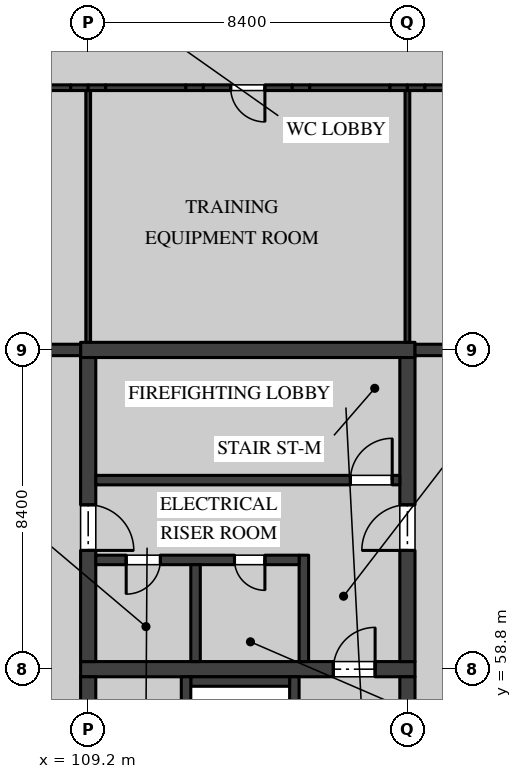
"""IFC4 building model, lengths in metres.
Left out: names, types, materials, properties, quantities, classifications, styles, units other than length and angle.
Written with IfcOpenShell. Run it as: python <this file> out.ifc"""

import sys

from ifc_helpers import new_model, si_unit, direction, frame, frame_2d, origin, place, context, subcontext, project, spatial, rectangle, extrude, element, fill, save


model = new_model("IFC4")
c1 = context("Model", 3, precision=1e-05, world=origin(), true_north=direction((0.0, 1.0)))
c2 = subcontext(c1, "Body", "Model", "MODEL_VIEW")
j1 = project(units=[si_unit("LENGTHUNIT", "METRE"), si_unit("PLANEANGLEUNIT", "RADIAN")], contexts=[c1])
p1 = place(None, origin())
s1 = spatial("IfcSite", under=j1, at=p1, CompositionType="ELEMENT")
p2 = place(p1, origin())
s2 = spatial("IfcBuilding", under=s1, at=p2, CompositionType="ELEMENT")
p3 = place(p2, frame((0.0, 0.0, 18.9)))
s3 = spatial("IfcBuildingStorey", under=s2, at=p3, CompositionType="ELEMENT", Elevation=18.9)
p4 = place(p3, frame((109.0, 58.8, 0.0), z_axis=(0.0, 0.0, 1.0), x_axis=(1.0, 0.0, 0.0)))
e1 = element("IfcWall", 1, at=p4, inside=s3, PredefinedType="SHEAR", context=c2, shape_type="SweptSolid", body=[
    extrude(rectangle(XDim=8.8, YDim=0.4, at=frame_2d((4.4, 0.0))), origin(), (0.0, 0.0, 1.0), 4.37),
])
p5 = place(p4, frame((6.65, 0.0, 0.0)))
e2 = element("IfcOpeningElement", 2, at=p5, cuts=e1, PredefinedType="OPENING", context=c2, shape_type="SweptSolid", body=[
    extrude(rectangle(XDim=1.1, YDim=2.1, at=frame_2d((0.55, 1.05))), frame((0.0, 0.21, 0.0), z_axis=(0.0, -1.0, 0.0), x_axis=(1.0, 0.0, 0.0)), (0.0, 0.0, 1.0), 0.42),
])
p6 = place(p3, frame((109.2, 50.6, 0.0), z_axis=(0.0, 0.0, 1.0), x_axis=(0.0, 1.0, 0.0)))
e3 = element("IfcWall", 3, at=p6, inside=s3, PredefinedType="SHEAR", context=c2, shape_type="SweptSolid", body=[
    extrude(rectangle(XDim=8.0, YDim=0.4, at=frame_2d((4.0, 0.0))), origin(), (0.0, 0.0, 1.0), 4.37),
])
p7 = place(p6, frame((3.25, 0.0, 0.0)))
e4 = element("IfcOpeningElement", 4, at=p7, cuts=e3, PredefinedType="OPENING", context=c2, shape_type="SweptSolid", body=[
    extrude(rectangle(XDim=1.2, YDim=2.1, at=frame_2d((0.6, 1.05))), frame((0.0, 0.21, 0.0), z_axis=(0.0, -1.0, 0.0), x_axis=(1.0, 0.0, 0.0)), (0.0, 0.0, 1.0), 0.42),
])
p8 = place(p3, frame((117.6, 50.6, 0.0), z_axis=(0.0, 0.0, 1.0), x_axis=(0.0, 1.0, 0.0)))
e5 = element("IfcWall", 5, at=p8, inside=s3, PredefinedType="SHEAR", context=c2, shape_type="SweptSolid", body=[
    extrude(rectangle(XDim=8.0, YDim=0.4, at=frame_2d((4.0, 0.0))), origin(), (0.0, 0.0, 1.0), 4.37),
])
p9 = place(p8, frame((3.25, 0.0, 0.0)))
e6 = element("IfcOpeningElement", 6, at=p9, cuts=e5, PredefinedType="OPENING", context=c2, shape_type="SweptSolid", body=[
    extrude(rectangle(XDim=1.2, YDim=2.1, at=frame_2d((0.6, 1.05))), frame((0.0, 0.21, 0.0), z_axis=(0.0, -1.0, 0.0), x_axis=(1.0, 0.0, 0.0)), (0.0, 0.0, 1.0), 0.42),
])
p10 = place(p8, frame((6.0, 0.0, 0.0)))
e7 = element("IfcOpeningElement", 7, at=p10, cuts=e5, PredefinedType="OPENING", context=c2, shape_type="SweptSolid", body=[
    extrude(rectangle(XDim=1.2, YDim=2.1, at=frame_2d((0.6, 1.05))), frame((0.0, 0.21, 0.0), z_axis=(0.0, -1.0, 0.0), x_axis=(1.0, 0.0, 0.0)), (0.0, 0.0, 1.0), 0.42),
])
p11 = place(p3, frame((109.0, 67.2, 0.0), z_axis=(0.0, 0.0, 1.0), x_axis=(1.0, 0.0, 0.0)))
e8 = element("IfcWall", 8, at=p11, inside=s3, PredefinedType="SHEAR", context=c2, shape_type="SweptSolid", body=[
    extrude(rectangle(XDim=8.8, YDim=0.4, at=frame_2d((4.4, 0.0))), origin(), (0.0, 0.0, 1.0), 4.37),
])
p12 = place(p3, frame((109.2, 59.0, 0.0), z_axis=(0.0, 0.0, 1.0), x_axis=(0.0, 1.0, 0.0)))
e9 = element("IfcWall", 9, at=p12, inside=s3, PredefinedType="SHEAR", context=c2, shape_type="SweptSolid", body=[
    extrude(rectangle(XDim=8.0, YDim=0.4, at=frame_2d((4.0, 0.0))), origin(), (0.0, 0.0, 1.0), 4.37),
])
p13 = place(p12, frame((2.925, 0.0, 0.0)))
e10 = element("IfcOpeningElement", 10, at=p13, cuts=e9, PredefinedType="OPENING", context=c2, shape_type="SweptSolid", body=[
    extrude(rectangle(XDim=1.2, YDim=2.1, at=frame_2d((0.6, 1.05))), frame((0.0, 0.21, 0.0), z_axis=(0.0, -1.0, 0.0), x_axis=(1.0, 0.0, 0.0)), (0.0, 0.0, 1.0), 0.42),
])
p14 = place(p3, frame((117.6, 59.0, 0.0), z_axis=(0.0, 0.0, 1.0), x_axis=(0.0, 1.0, 0.0)))
e11 = element("IfcWall", 11, at=p14, inside=s3, PredefinedType="SHEAR", context=c2, shape_type="SweptSolid", body=[
    extrude(rectangle(XDim=8.0, YDim=0.4, at=frame_2d((4.0, 0.0))), origin(), (0.0, 0.0, 1.0), 4.37),
])
p15 = place(p14, frame((2.925, 0.0, 0.0)))
e12 = element("IfcOpeningElement", 12, at=p15, cuts=e11, PredefinedType="OPENING", context=c2, shape_type="SweptSolid", body=[
    extrude(rectangle(XDim=1.2, YDim=2.1, at=frame_2d((0.6, 1.05))), frame((0.0, 0.21, 0.0), z_axis=(0.0, -1.0, 0.0), x_axis=(1.0, 0.0, 0.0)), (0.0, 0.0, 1.0), 0.42),
])
p16 = place(p3, frame((117.4, 63.775, 0.0), z_axis=(0.0, 0.0, 1.0), x_axis=(-1.0, 0.0, 0.0)))
e13 = element("IfcWall", 13, at=p16, inside=s3, PredefinedType="SOLIDWALL", context=c2, shape_type="SweptSolid", body=[
    extrude(rectangle(XDim=8.0, YDim=0.25, at=frame_2d((4.0, 0.0))), origin(), (0.0, 0.0, 1.0), 4.37),
])
p17 = place(p16, frame((0.2, 0.0, 0.0)))
e14 = element("IfcOpeningElement", 14, at=p17, cuts=e13, PredefinedType="OPENING", context=c2, shape_type="SweptSolid", body=[
    extrude(rectangle(XDim=1.1, YDim=2.1, at=frame_2d((0.55, 1.05))), frame((0.0, 0.135, 0.0), z_axis=(0.0, -1.0, 0.0), x_axis=(1.0, 0.0, 0.0)), (0.0, 0.0, 1.0), 0.27),
])
p18 = place(p3, frame((114.875, 61.8, 0.0), z_axis=(0.0, 0.0, 1.0), x_axis=(0.0, -1.0, 0.0)))
e15 = element("IfcWall", 15, at=p18, inside=s3, PredefinedType="SOLIDWALL", context=c2, shape_type="SweptSolid", body=[
    extrude(rectangle(XDim=2.8, YDim=0.25, at=frame_2d((1.4, 0.0))), origin(), (0.0, 0.0, 1.0), 4.37),
])
p19 = place(p3, frame((114.75, 61.675, 0.0), z_axis=(0.0, 0.0, 1.0), x_axis=(-1.0, 0.0, 0.0)))
e16 = element("IfcWall", 16, at=p19, inside=s3, PredefinedType="SOLIDWALL", context=c2, shape_type="SweptSolid", body=[
    extrude(rectangle(XDim=5.35, YDim=0.25, at=frame_2d((2.675, 0.0))), origin(), (0.0, 0.0, 1.0), 4.37),
])
p20 = place(p19, frame((3.65, 0.0, 0.0)))
e17 = element("IfcOpeningElement", 17, at=p20, cuts=e16, PredefinedType="OPENING", context=c2, shape_type="SweptSolid", body=[
    extrude(rectangle(XDim=0.9, YDim=2.1, at=frame_2d((0.45, 1.05))), frame((0.0, 0.135, 0.0), z_axis=(0.0, -1.0, 0.0), x_axis=(1.0, 0.0, 0.0)), (0.0, 0.0, 1.0), 0.27),
])
p21 = place(p19, frame((0.9, 0.0, 0.0)))
e18 = element("IfcOpeningElement", 18, at=p21, cuts=e16, PredefinedType="OPENING", context=c2, shape_type="SweptSolid", body=[
    extrude(rectangle(XDim=0.8, YDim=2.1, at=frame_2d((0.4, 1.05))), frame((0.0, 0.135, 0.0), z_axis=(0.0, -1.0, 0.0), x_axis=(1.0, 0.0, 0.0)), (0.0, 0.0, 1.0), 0.27),
])
p22 = place(p3, frame((112.025, 61.55, 0.0), z_axis=(0.0, 0.0, 1.0), x_axis=(0.0, -1.0, 0.0)))
e19 = element("IfcWall", 19, at=p22, inside=s3, PredefinedType="SOLIDWALL", context=c2, shape_type="SweptSolid", body=[
    extrude(rectangle(XDim=2.55, YDim=0.25, at=frame_2d((1.275, 0.0))), origin(), (0.0, 0.0, 1.0), 4.37),
])
p23 = place(p3, frame((114.625, 55.5, 0.0), z_axis=(0.0, 0.0, 1.0), x_axis=(0.0, 1.0, 0.0)))
e20 = element("IfcWall", 20, at=p23, inside=s3, PredefinedType="SOLIDWALL", context=c2, shape_type="SweptSolid", body=[
    extrude(rectangle(XDim=3.1, YDim=0.25, at=frame_2d((1.55, 0.0))), origin(), (0.0, 0.0, 1.0), 4.37),
])
p24 = place(p23, frame((1.0, 0.0, 0.0)))
e21 = element("IfcOpeningElement", 21, at=p24, cuts=e20, PredefinedType="OPENING", context=c2, shape_type="SweptSolid", body=[
    extrude(rectangle(XDim=1.1, YDim=2.1, at=frame_2d((0.55, 1.05))), frame((0.0, 0.135, 0.0), z_axis=(0.0, -1.0, 0.0), x_axis=(1.0, 0.0, 0.0)), (0.0, 0.0, 1.0), 0.27),
])
p25 = place(p3, frame((111.9, 58.475, 0.0), z_axis=(0.0, 0.0, 1.0), x_axis=(1.0, 0.0, 0.0)))
e22 = element("IfcWall", 22, at=p25, inside=s3, PredefinedType="SOLIDWALL", context=c2, shape_type="SweptSolid", body=[
    extrude(rectangle(XDim=2.6, YDim=0.25, at=frame_2d((1.3, 0.0))), origin(), (0.0, 0.0, 1.0), 4.37),
])
p26 = place(p3, frame((111.775, 55.5, 0.0), z_axis=(0.0, 0.0, 1.0), x_axis=(0.0, 1.0, 0.0)))
e23 = element("IfcWall", 23, at=p26, inside=s3, PredefinedType="SOLIDWALL", context=c2, shape_type="SweptSolid", body=[
    extrude(rectangle(XDim=3.1, YDim=0.25, at=frame_2d((1.55, 0.0))), origin(), (0.0, 0.0, 1.0), 4.37),
])
p27 = place(p3, frame((106.63, 74.1, 0.0), z_axis=(0.0, 0.0, 1.0), x_axis=(1.0, 0.0, 0.0)))
e24 = element("IfcWall", 24, at=p27, inside=s3, PredefinedType="PARTITIONING", context=c2, shape_type="SweptSolid", body=[
    extrude(rectangle(XDim=2.11, YDim=0.15, at=frame_2d((1.055, 0.0))), origin(), (0.0, 0.0, 1.0), 4.37),
])
for number, where, z_axis, x_axis in (
    (25, (108.74, 74.1, 0.0), (0.0, 0.0, 1.0), (1.0, 0.0, 0.0)),
    (26, (109.2, 74.1, 0.0), (0.0, 0.0, 1.0), (1.0, 0.0, 0.0)),
):
    element("IfcWall", number, at=place(p3, frame(where, z_axis=z_axis, x_axis=x_axis)), inside=s3, PredefinedType="PARTITIONING", context=c2, shape_type="SweptSolid", body=[
        extrude(rectangle(XDim=0.46, YDim=0.15, at=frame_2d((0.23, 0.0))), origin(), (0.0, 0.0, 1.0), 3.819),
    ])
p28 = place(p3, frame((109.66, 74.1, 0.0), z_axis=(0.0, 0.0, 1.0), x_axis=(1.0, 0.0, 0.0)))
e27 = element("IfcWall", 27, at=p28, inside=s3, PredefinedType="PARTITIONING", context=c2, shape_type="SweptSolid", body=[
    extrude(rectangle(XDim=2.11, YDim=0.15, at=frame_2d((1.055, 0.0))), origin(), (0.0, 0.0, 1.0), 4.37),
])
p29 = place(p3, frame((111.77, 74.1, 0.0), z_axis=(0.0, 0.0, 1.0), x_axis=(1.0, 0.0, 0.0)))
e28 = element("IfcWall", 28, at=p29, inside=s3, PredefinedType="PARTITIONING", context=c2, shape_type="SweptSolid", body=[
    extrude(rectangle(XDim=0.46, YDim=0.15, at=frame_2d((0.23, 0.0))), origin(), (0.0, 0.0, 1.0), 3.946),
])
p30 = place(p3, frame((112.23, 74.1, 0.0), z_axis=(0.0, 0.0, 1.0), x_axis=(1.0, 0.0, 0.0)))
e29 = element("IfcWall", 29, at=p30, inside=s3, PredefinedType="PARTITIONING", context=c2, shape_type="SweptSolid", body=[
    extrude(rectangle(XDim=2.34, YDim=0.15, at=frame_2d((1.17, 0.0))), origin(), (0.0, 0.0, 1.0), 4.37),
])
p31 = place(p30, frame((0.72, 0.0, 0.0)))
e30 = element("IfcOpeningElement", 30, at=p31, cuts=e29, PredefinedType="OPENING", context=c2, shape_type="SweptSolid", body=[
    extrude(rectangle(XDim=0.9, YDim=2.1, at=frame_2d((0.45, 1.05))), frame((0.0, 0.085, 0.0), z_axis=(0.0, -1.0, 0.0), x_axis=(1.0, 0.0, 0.0)), (0.0, 0.0, 1.0), 0.17),
])
p32 = place(p3, frame((114.57, 74.1, 0.0), z_axis=(0.0, 0.0, 1.0), x_axis=(1.0, 0.0, 0.0)))
e31 = element("IfcWall", 31, at=p32, inside=s3, PredefinedType="PARTITIONING", context=c2, shape_type="SweptSolid", body=[
    extrude(rectangle(XDim=0.46, YDim=0.15, at=frame_2d((0.23, 0.0))), origin(), (0.0, 0.0, 1.0), 3.946),
])
p33 = place(p3, frame((115.03, 74.1, 0.0), z_axis=(0.0, 0.0, 1.0), x_axis=(1.0, 0.0, 0.0)))
e32 = element("IfcWall", 32, at=p33, inside=s3, PredefinedType="PARTITIONING", context=c2, shape_type="SweptSolid", body=[
    extrude(rectangle(XDim=2.11, YDim=0.15, at=frame_2d((1.055, 0.0))), origin(), (0.0, 0.0, 1.0), 4.37),
])
p34 = place(p3, frame((117.14, 74.1, 0.0), z_axis=(0.0, 0.0, 1.0), x_axis=(1.0, 0.0, 0.0)))
e33 = element("IfcWall", 33, at=p34, inside=s3, PredefinedType="PARTITIONING", context=c2, shape_type="SweptSolid", body=[
    extrude(rectangle(XDim=0.46, YDim=0.15, at=frame_2d((0.23, 0.0))), origin(), (0.0, 0.0, 1.0), 3.819),
])
p35 = place(p3, frame((117.6, 74.1, 0.0), z_axis=(0.0, 0.0, 1.0), x_axis=(1.0, 0.0, 0.0)))
e34 = element("IfcWall", 34, at=p35, inside=s3, PredefinedType="PARTITIONING", context=c2, shape_type="SweptSolid", body=[
    extrude(rectangle(XDim=0.46, YDim=0.15, at=frame_2d((0.23, 0.0))), origin(), (0.0, 0.0, 1.0), 3.819),
])
p36 = place(p3, frame((118.06, 74.1, 0.0), z_axis=(0.0, 0.0, 1.0), x_axis=(1.0, 0.0, 0.0)))
e35 = element("IfcWall", 35, at=p36, inside=s3, PredefinedType="PARTITIONING", context=c2, shape_type="SweptSolid", body=[
    extrude(rectangle(XDim=2.11, YDim=0.15, at=frame_2d((1.055, 0.0))), origin(), (0.0, 0.0, 1.0), 4.37),
])
for number, where, z_axis, x_axis in (
    (36, (109.2, 67.4, 0.0), (0.0, 0.0, 1.0), (0.0, 1.0, 0.0)),
    (37, (117.6, 67.4, 0.0), (0.0, 0.0, 1.0), (0.0, 1.0, 0.0)),
):
    element("IfcWall", number, at=place(p3, frame(where, z_axis=z_axis, x_axis=x_axis)), inside=s3, PredefinedType="PARTITIONING", context=c2, shape_type="SweptSolid", body=[
        extrude(rectangle(XDim=6.625, YDim=0.125, at=frame_2d((3.312, 0.0))), origin(), (0.0, 0.0, 1.0), 3.819),
    ])
for number, where, z_axis, x_axis in (
    (38, (125.997, 67.2, 0.0), (0.0, 0.0, 1.0), (-1.0, 0.0, 0.0)),
    (39, (109.0, 67.2, 0.0), (0.0, 0.0, 1.0), (-1.0, 0.0, 0.0)),
):
    element("IfcWall", number, at=place(p3, frame(where, z_axis=z_axis, x_axis=x_axis)), inside=s3, PredefinedType="SOLIDWALL", context=c2, shape_type="SweptSolid", body=[
        extrude(rectangle(XDim=8.197, YDim=0.3, at=frame_2d((4.099, 0.0))), origin(), (0.0, 0.0, 1.0), 3.746),
    ])
p37 = place(p5, origin())
e40 = element("IfcDoor", 40, at=p37, inside=s3, OperationType="SINGLE_SWING_LEFT", PredefinedType="DOOR", context=c2, shape_type="SweptSolid", body=[
    extrude(rectangle(XDim=1.1, YDim=2.1, at=frame_2d((0.55, 1.05))), frame((0.0, 0.035, 0.0), z_axis=(0.0, -1.0, 0.0), x_axis=(1.0, 0.0, 0.0)), (0.0, 0.0, 1.0), 0.07),
])
fill(e2, e40)
p38 = place(p20, origin())
e41 = element("IfcDoor", 41, at=p38, inside=s3, OperationType="SINGLE_SWING_LEFT", PredefinedType="DOOR", context=c2, shape_type="SweptSolid", body=[
    extrude(rectangle(XDim=0.9, YDim=2.1, at=frame_2d((0.45, 1.05))), frame((0.0, 0.035, 0.0), z_axis=(0.0, -1.0, 0.0), x_axis=(1.0, 0.0, 0.0)), (0.0, 0.0, 1.0), 0.07),
])
fill(e17, e41)
p39 = place(p13, frame((1.2, 0.0, 0.0), z_axis=(0.0, 0.0, 1.0), x_axis=(-1.0, 0.0, 0.0)))
e42 = element("IfcDoor", 42, at=p39, inside=s3, OperationType="SINGLE_SWING_LEFT", PredefinedType="DOOR", context=c2, shape_type="SweptSolid", body=[
    extrude(rectangle(XDim=1.2, YDim=2.1, at=frame_2d((0.6, 1.05))), frame((0.0, 0.035, 0.0), z_axis=(0.0, -1.0, 0.0), x_axis=(1.0, 0.0, 0.0)), (0.0, 0.0, 1.0), 0.07),
])
fill(e10, e42)
p40 = place(p15, origin())
e43 = element("IfcDoor", 43, at=p40, inside=s3, OperationType="SINGLE_SWING_RIGHT", PredefinedType="DOOR", context=c2, shape_type="SweptSolid", body=[
    extrude(rectangle(XDim=1.2, YDim=2.1, at=frame_2d((0.6, 1.05))), frame((0.0, 0.035, 0.0), z_axis=(0.0, -1.0, 0.0), x_axis=(1.0, 0.0, 0.0)), (0.0, 0.0, 1.0), 0.07),
])
fill(e12, e43)
p41 = place(p21, origin())
e44 = element("IfcDoor", 44, at=p41, inside=s3, OperationType="SINGLE_SWING_RIGHT", PredefinedType="DOOR", context=c2, shape_type="SweptSolid", body=[
    extrude(rectangle(XDim=0.8, YDim=2.1, at=frame_2d((0.4, 1.05))), frame((0.0, 0.035, 0.0), z_axis=(0.0, -1.0, 0.0), x_axis=(1.0, 0.0, 0.0)), (0.0, 0.0, 1.0), 0.07),
])
fill(e18, e44)
p42 = place(p17, frame((1.1, 0.0, 0.0), z_axis=(0.0, 0.0, 1.0), x_axis=(-1.0, 0.0, 0.0)))
e45 = element("IfcDoor", 45, at=p42, inside=s3, OperationType="SINGLE_SWING_LEFT", PredefinedType="DOOR", context=c2, shape_type="SweptSolid", body=[
    extrude(rectangle(XDim=1.1, YDim=2.1, at=frame_2d((0.55, 1.05))), frame((0.0, 0.035, 0.0), z_axis=(0.0, -1.0, 0.0), x_axis=(1.0, 0.0, 0.0)), (0.0, 0.0, 1.0), 0.07),
])
fill(e14, e45)
p43 = place(p31, frame((0.9, 0.0, 0.0), z_axis=(0.0, 0.0, 1.0), x_axis=(-1.0, 0.0, 0.0)))
e46 = element("IfcDoor", 46, at=p43, inside=s3, OperationType="SINGLE_SWING_RIGHT", PredefinedType="DOOR", context=c2, shape_type="SweptSolid", body=[
    extrude(rectangle(XDim=0.9, YDim=2.1, at=frame_2d((0.45, 1.05))), frame((0.0, 0.025, 0.0), z_axis=(0.0, -1.0, 0.0), x_axis=(1.0, 0.0, 0.0)), (0.0, 0.0, 1.0), 0.05),
])
fill(e30, e46)
save(model, sys.argv[1])
